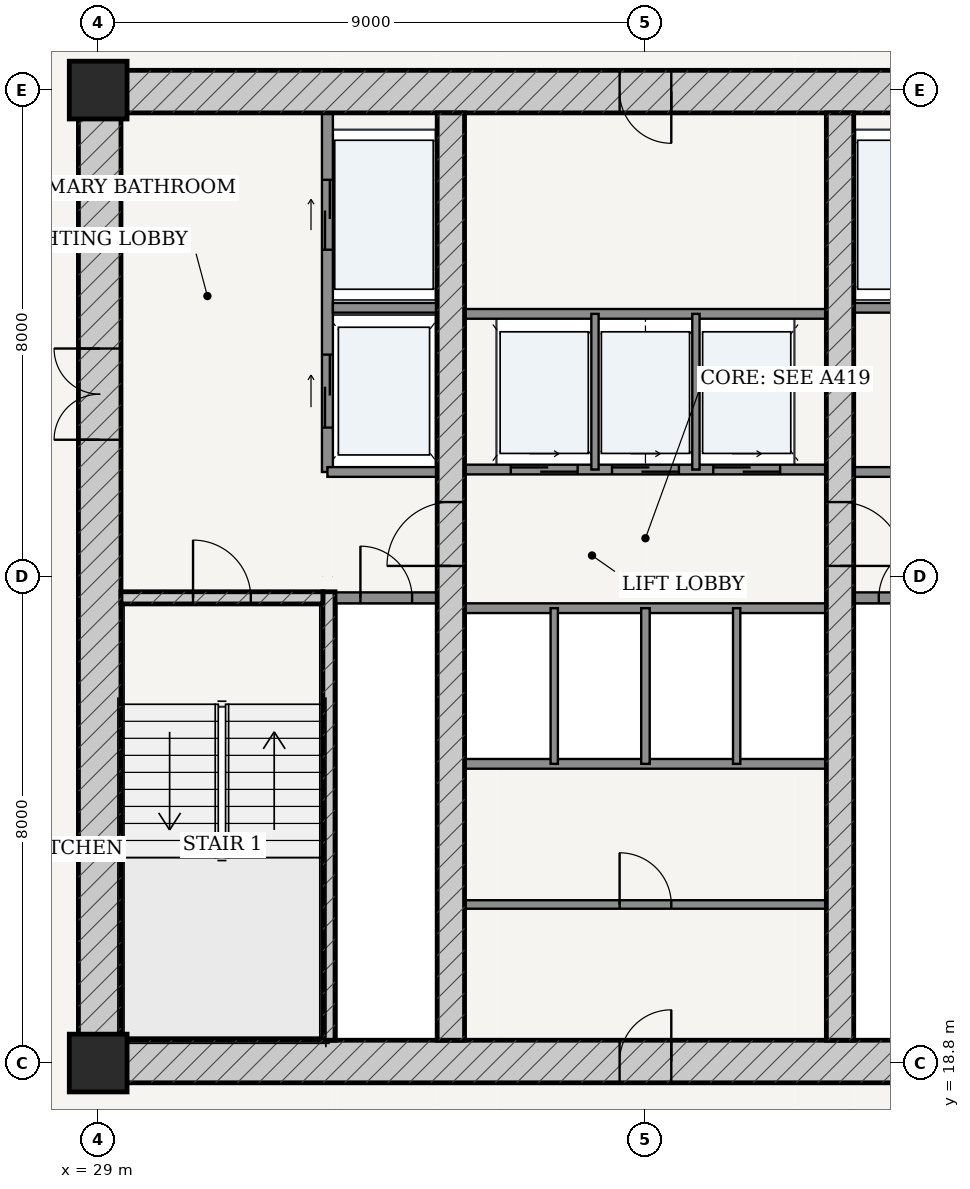
"""IFC4 building model, lengths in metres.
Left out: names, types, materials, properties, quantities, classifications, styles, units other than length and angle.
Written with IfcOpenShell. Run it as: python <this file> out.ifc"""

import sys

from ifc_helpers import new_model, si_unit, direction, frame, frame_2d, origin, origin_2d, place, context, subcontext, project, spatial, rectangle, extrude, source, transform, mapped, element, fill, save


model = new_model("IFC4")
c1 = context("Model", 3, precision=1e-05, world=origin(), true_north=direction((-0.2419218956, 0.970295726276)))
c2 = subcontext(c1, "Body", "Model", "MODEL_VIEW")
j1 = project(units=[si_unit("LENGTHUNIT", "METRE"), si_unit("PLANEANGLEUNIT", "RADIAN")], contexts=[c1])
p1 = place(None, origin())
s1 = spatial("IfcSite", under=j1, at=p1, CompositionType="ELEMENT")
p2 = place(p1, origin())
s2 = spatial("IfcBuilding", under=s1, at=p2, CompositionType="ELEMENT")
p3 = place(p2, frame((0.0, 0.0, 123.0)))
s3 = spatial("IfcBuildingStorey", under=s2, at=p3, CompositionType="ELEMENT", Elevation=123.0)
for number, where, z_axis, x_axis in (
    (1, (29.0, 18.8, 0.0), (0.0, 0.0, 1.0), (1.0, 0.0, 0.0)),
    (2, (29.0, 34.8, 0.0), (0.0, 0.0, 1.0), (1.0, 0.0, 0.0)),
):
    element("IfcColumn", number, at=place(p3, frame(where, z_axis=z_axis, x_axis=x_axis)), inside=s3, PredefinedType="COLUMN", context=c2, shape_type="SweptSolid", body=[
        extrude(rectangle(XDim=0.95, YDim=0.95, at=origin_2d()), origin(), (0.0, 0.0, 1.0), 3.6),
    ])
p4 = place(p3, frame((28.675, 18.825, 0.0), z_axis=(0.0, 0.0, 1.0), x_axis=(1.0, 0.0, 0.0)))
e3 = element("IfcWall", 3, at=p4, inside=s3, PredefinedType="SHEAR", context=c2, shape_type="SweptSolid", body=[
    extrude(rectangle(XDim=18.65, YDim=0.7, at=frame_2d((9.325, 0.0))), origin(), (0.0, 0.0, 1.0), 3.325),
])
p5 = place(p4, frame((8.9, 0.0, 0.0)))
e4 = element("IfcOpeningElement", 4, at=p5, cuts=e3, PredefinedType="OPENING", context=c2, shape_type="SweptSolid", body=[
    extrude(rectangle(XDim=0.85, YDim=2.1, at=frame_2d((0.425, 1.05))), frame((0.0, 0.36, 0.0), z_axis=(0.0, -1.0, 0.0), x_axis=(1.0, 0.0, 0.0)), (0.0, 0.0, 1.0), 0.72),
])
p6 = place(p3, frame((28.675, 34.775, 0.0), z_axis=(0.0, 0.0, 1.0), x_axis=(1.0, 0.0, 0.0)))
e5 = element("IfcWall", 5, at=p6, inside=s3, PredefinedType="SHEAR", context=c2, shape_type="SweptSolid", body=[
    extrude(rectangle(XDim=18.65, YDim=0.7, at=frame_2d((9.325, 0.0))), origin(), (0.0, 0.0, 1.0), 3.325),
])
p7 = place(p6, frame((8.9, 0.0, 0.0)))
e6 = element("IfcOpeningElement", 6, at=p7, cuts=e5, PredefinedType="OPENING", context=c2, shape_type="SweptSolid", body=[
    extrude(rectangle(XDim=0.85, YDim=2.1, at=frame_2d((0.425, 1.05))), frame((0.0, 0.36, 0.0), z_axis=(0.0, -1.0, 0.0), x_axis=(1.0, 0.0, 0.0)), (0.0, 0.0, 1.0), 0.72),
])
p8 = place(p3, frame((29.025, 19.175, 0.0), z_axis=(0.0, 0.0, 1.0), x_axis=(0.0, 1.0, 0.0)))
e7 = element("IfcWall", 7, at=p8, inside=s3, PredefinedType="SHEAR", context=c2, shape_type="SweptSolid", body=[
    extrude(rectangle(XDim=15.25, YDim=0.7, at=frame_2d((7.625, 0.0))), origin(), (0.0, 0.0, 1.0), 3.325),
])
p9 = place(p8, frame((9.875, 0.0, 0.0)))
e8 = element("IfcOpeningElement", 8, at=p9, cuts=e7, PredefinedType="OPENING", context=c2, shape_type="SweptSolid", body=[
    extrude(rectangle(XDim=1.5, YDim=2.2, at=frame_2d((0.75, 1.1))), frame((0.0, 0.36, 0.0), z_axis=(0.0, -1.0, 0.0), x_axis=(1.0, 0.0, 0.0)), (0.0, 0.0, 1.0), 0.72),
])
p10 = place(p3, frame((32.795, 19.175, 0.0), z_axis=(0.0, 0.0, 1.0), x_axis=(0.0, 1.0, 0.0)))
e9 = element("IfcWall", 9, at=p10, inside=s3, PredefinedType="SOLIDWALL", context=c2, shape_type="SweptSolid", body=[
    extrude(rectangle(XDim=7.375, YDim=0.2, at=frame_2d((3.688, 0.0))), origin(), (0.0, 0.0, 1.0), 3.325),
])
p11 = place(p3, frame((29.375, 26.45, 0.0), z_axis=(0.0, 0.0, 1.0), x_axis=(1.0, 0.0, 0.0)))
e10 = element("IfcWall", 10, at=p11, inside=s3, PredefinedType="SOLIDWALL", context=c2, shape_type="SweptSolid", body=[
    extrude(rectangle(XDim=3.32, YDim=0.2, at=frame_2d((1.66, 0.0))), origin(), (0.0, 0.0, 1.0), 3.325),
])
p12 = place(p11, frame((1.185, 0.0, 0.0)))
e11 = element("IfcOpeningElement", 11, at=p12, cuts=e10, PredefinedType="OPENING", context=c2, shape_type="SweptSolid", body=[
    extrude(rectangle(XDim=0.95, YDim=2.15, at=frame_2d((0.475, 1.075))), frame((0.0, 0.11, 0.0), z_axis=(0.0, -1.0, 0.0), x_axis=(1.0, 0.0, 0.0)), (0.0, 0.0, 1.0), 0.22),
])
p13 = place(p3, frame((34.8, 19.175, 0.0), z_axis=(0.0, 0.0, 1.0), x_axis=(0.0, 1.0, 0.0)))
e12 = element("IfcWall", 12, at=p13, inside=s3, PredefinedType="SHEAR", context=c2, shape_type="SweptSolid", body=[
    extrude(rectangle(XDim=15.25, YDim=0.45, at=frame_2d((7.625, 0.0))), origin(), (0.0, 0.0, 1.0), 3.325),
])
p14 = place(p13, frame((7.8, 0.0, 0.0)))
e13 = element("IfcOpeningElement", 13, at=p14, cuts=e12, PredefinedType="OPENING", context=c2, shape_type="SweptSolid", body=[
    extrude(rectangle(XDim=1.05, YDim=2.15, at=frame_2d((0.525, 1.075))), frame((0.0, 0.235, 0.0), z_axis=(0.0, -1.0, 0.0), x_axis=(1.0, 0.0, 0.0)), (0.0, 0.0, 1.0), 0.47),
])
p15 = place(p3, frame((41.2, 19.175, 0.0), z_axis=(0.0, 0.0, 1.0), x_axis=(0.0, 1.0, 0.0)))
e14 = element("IfcWall", 14, at=p15, inside=s3, PredefinedType="SHEAR", context=c2, shape_type="SweptSolid", body=[
    extrude(rectangle(XDim=15.25, YDim=0.45, at=frame_2d((7.625, 0.0))), origin(), (0.0, 0.0, 1.0), 3.325),
])
p16 = place(p15, frame((7.8, 0.0, 0.0)))
e15 = element("IfcOpeningElement", 15, at=p16, cuts=e14, PredefinedType="OPENING", context=c2, shape_type="SweptSolid", body=[
    extrude(rectangle(XDim=1.05, YDim=2.15, at=frame_2d((0.525, 1.075))), frame((0.0, 0.235, 0.0), z_axis=(0.0, -1.0, 0.0), x_axis=(1.0, 0.0, 0.0)), (0.0, 0.0, 1.0), 0.47),
])
p17 = place(p3, frame((32.9, 26.45, 0.0), z_axis=(0.0, 0.0, 1.0), x_axis=(1.0, 0.0, 0.0)))
e16 = element("IfcWall", 16, at=p17, inside=s3, PredefinedType="PARTITIONING", context=c2, shape_type="SweptSolid", body=[
    extrude(rectangle(XDim=1.675, YDim=0.18, at=frame_2d((0.837, 0.0))), origin(), (0.0, 0.0, 1.0), 3.325),
])
p18 = place(p17, frame((0.413, 0.0, 0.0)))
e17 = element("IfcOpeningElement", 17, at=p18, cuts=e16, PredefinedType="OPENING", context=c2, shape_type="SweptSolid", body=[
    extrude(rectangle(XDim=0.85, YDim=2.1, at=frame_2d((0.425, 1.05))), frame((0.0, 0.1, 0.0), z_axis=(0.0, -1.0, 0.0), x_axis=(1.0, 0.0, 0.0)), (0.0, 0.0, 1.0), 0.2),
])
p19 = place(p3, frame((41.425, 26.45, 0.0), z_axis=(0.0, 0.0, 1.0), x_axis=(1.0, 0.0, 0.0)))
e18 = element("IfcWall", 18, at=p19, inside=s3, PredefinedType="PARTITIONING", context=c2, shape_type="SweptSolid", body=[
    extrude(rectangle(XDim=1.675, YDim=0.18, at=frame_2d((0.837, 0.0))), origin(), (0.0, 0.0, 1.0), 3.325),
])
p20 = place(p19, frame((0.413, 0.0, 0.0)))
e19 = element("IfcOpeningElement", 19, at=p20, cuts=e18, PredefinedType="OPENING", context=c2, shape_type="SweptSolid", body=[
    extrude(rectangle(XDim=0.85, YDim=2.1, at=frame_2d((0.425, 1.05))), frame((0.0, 0.1, 0.0), z_axis=(0.0, -1.0, 0.0), x_axis=(1.0, 0.0, 0.0)), (0.0, 0.0, 1.0), 0.2),
])
p21 = place(p3, frame((32.77, 28.52, 0.0), z_axis=(0.0, 0.0, 1.0), x_axis=(0.0, 1.0, 0.0)))
e20 = element("IfcWall", 20, at=p21, inside=s3, PredefinedType="PARTITIONING", context=c2, shape_type="SweptSolid", body=[
    extrude(rectangle(XDim=5.905, YDim=0.18, at=frame_2d((2.953, 0.0))), origin(), (0.0, 0.0, 1.0), 3.325),
])
p22 = place(p21, frame((3.655, 0.0, 0.0)))
e21 = element("IfcOpeningElement", 21, at=p22, cuts=e20, PredefinedType="OPENING", context=c2, shape_type="SweptSolid", body=[
    extrude(rectangle(XDim=1.15, YDim=2.2, at=frame_2d((0.575, 1.1))), frame((0.0, 0.1, 0.0), z_axis=(0.0, -1.0, 0.0), x_axis=(1.0, 0.0, 0.0)), (0.0, 0.0, 1.0), 0.2),
])
p23 = place(p21, frame((0.73, 0.0, 0.0)))
e22 = element("IfcOpeningElement", 22, at=p23, cuts=e20, PredefinedType="OPENING", context=c2, shape_type="SweptSolid", body=[
    extrude(rectangle(XDim=1.2, YDim=2.25, at=frame_2d((0.6, 1.125))), frame((0.0, 0.1, 0.0), z_axis=(0.0, -1.0, 0.0), x_axis=(1.0, 0.0, 0.0)), (0.0, 0.0, 1.0), 0.2),
])
p24 = place(p3, frame((32.86, 31.22, 0.0), z_axis=(0.0, 0.0, 1.0), x_axis=(1.0, 0.0, 0.0)))
e23 = element("IfcWall", 23, at=p24, inside=s3, PredefinedType="PARTITIONING", context=c2, shape_type="SweptSolid", body=[
    extrude(rectangle(XDim=1.715, YDim=0.16, at=frame_2d((0.857, 0.0))), origin(), (0.0, 0.0, 1.0), 3.325),
])
p25 = place(p3, frame((32.77, 28.52, 0.0), z_axis=(0.0, 0.0, 1.0), x_axis=(1.0, 0.0, 0.0)))
e24 = element("IfcWall", 24, at=p25, inside=s3, PredefinedType="PARTITIONING", context=c2, shape_type="SweptSolid", body=[
    extrude(rectangle(XDim=1.805, YDim=0.16, at=frame_2d((0.902, 0.0))), origin(), (0.0, 0.0, 1.0), 3.325),
])
p26 = place(p3, frame((41.425, 31.22, 0.0), z_axis=(0.0, 0.0, 1.0), x_axis=(1.0, 0.0, 0.0)))
e25 = element("IfcWall", 25, at=p26, inside=s3, PredefinedType="PARTITIONING", context=c2, shape_type="SweptSolid", body=[
    extrude(rectangle(XDim=1.715, YDim=0.16, at=frame_2d((0.857, 0.0))), origin(), (0.0, 0.0, 1.0), 3.325),
])
p27 = place(p3, frame((41.425, 28.52, 0.0), z_axis=(0.0, 0.0, 1.0), x_axis=(1.0, 0.0, 0.0)))
e26 = element("IfcWall", 26, at=p27, inside=s3, PredefinedType="PARTITIONING", context=c2, shape_type="SweptSolid", body=[
    extrude(rectangle(XDim=1.805, YDim=0.16, at=frame_2d((0.902, 0.0))), origin(), (0.0, 0.0, 1.0), 3.325),
])
p28 = place(p3, frame((35.025, 28.56, 0.0), z_axis=(0.0, 0.0, 1.0), x_axis=(1.0, 0.0, 0.0)))
e27 = element("IfcWall", 27, at=p28, inside=s3, PredefinedType="PARTITIONING", context=c2, shape_type="SweptSolid", body=[
    extrude(rectangle(XDim=5.95, YDim=0.16, at=frame_2d((2.975, 0.0))), origin(), (0.0, 0.0, 1.0), 3.325),
])
p29 = place(p28, frame((0.76, 0.0, 0.0)))
e28 = element("IfcOpeningElement", 28, at=p29, cuts=e27, PredefinedType="OPENING", context=c2, shape_type="SweptSolid", body=[
    extrude(rectangle(XDim=1.1, YDim=2.2, at=frame_2d((0.55, 1.1))), frame((0.0, 0.09, 0.0), z_axis=(0.0, -1.0, 0.0), x_axis=(1.0, 0.0, 0.0)), (0.0, 0.0, 1.0), 0.18),
])
p30 = place(p28, frame((2.425, 0.0, 0.0)))
e29 = element("IfcOpeningElement", 29, at=p30, cuts=e27, PredefinedType="OPENING", context=c2, shape_type="SweptSolid", body=[
    extrude(rectangle(XDim=1.1, YDim=2.2, at=frame_2d((0.55, 1.1))), frame((0.0, 0.09, 0.0), z_axis=(0.0, -1.0, 0.0), x_axis=(1.0, 0.0, 0.0)), (0.0, 0.0, 1.0), 0.18),
])
p31 = place(p28, frame((4.09, 0.0, 0.0)))
e30 = element("IfcOpeningElement", 30, at=p31, cuts=e27, PredefinedType="OPENING", context=c2, shape_type="SweptSolid", body=[
    extrude(rectangle(XDim=1.1, YDim=2.2, at=frame_2d((0.55, 1.1))), frame((0.0, 0.09, 0.0), z_axis=(0.0, -1.0, 0.0), x_axis=(1.0, 0.0, 0.0)), (0.0, 0.0, 1.0), 0.18),
])
p32 = place(p3, frame((35.025, 31.12, 0.0), z_axis=(0.0, 0.0, 1.0), x_axis=(1.0, 0.0, 0.0)))
e31 = element("IfcWall", 31, at=p32, inside=s3, PredefinedType="PARTITIONING", context=c2, shape_type="SweptSolid", body=[
    extrude(rectangle(XDim=5.95, YDim=0.16, at=frame_2d((2.975, 0.0))), origin(), (0.0, 0.0, 1.0), 3.325),
])
for number, where, z_axis, x_axis in (
    (32, (37.17, 28.56, 0.0), (0.0, 0.0, 1.0), (0.0, 1.0, 0.0)),
    (33, (38.83, 28.56, 0.0), (0.0, 0.0, 1.0), (0.0, 1.0, 0.0)),
):
    element("IfcWall", number, at=place(p3, frame(where, z_axis=z_axis, x_axis=x_axis)), inside=s3, PredefinedType="PARTITIONING", context=c2, shape_type="SweptSolid", body=[
        extrude(rectangle(XDim=2.56, YDim=0.12, at=frame_2d((1.28, 0.0))), origin(), (0.0, 0.0, 1.0), 3.325),
    ])
for number, where, z_axis, x_axis in (
    (34, (35.025, 26.28, 0.0), (0.0, 0.0, 1.0), (1.0, 0.0, 0.0)),
    (35, (35.025, 23.72, 0.0), (0.0, 0.0, 1.0), (1.0, 0.0, 0.0)),
):
    element("IfcWall", number, at=place(p3, frame(where, z_axis=z_axis, x_axis=x_axis)), inside=s3, PredefinedType="PARTITIONING", context=c2, shape_type="SweptSolid", body=[
        extrude(rectangle(XDim=5.95, YDim=0.16, at=frame_2d((2.975, 0.0))), origin(), (0.0, 0.0, 1.0), 3.325),
    ])
p33 = place(p3, frame((36.5, 23.72, 0.0), z_axis=(0.0, 0.0, 1.0), x_axis=(0.0, 1.0, 0.0)))
e36 = element("IfcWall", 36, at=p33, inside=s3, PredefinedType="PARTITIONING", context=c2, shape_type="SweptSolid", body=[
    extrude(rectangle(XDim=2.56, YDim=0.12, at=frame_2d((1.28, 0.0))), origin(), (0.0, 0.0, 1.0), 3.325),
])
p34 = place(p3, frame((38.0, 23.72, 0.0), z_axis=(0.0, 0.0, 1.0), x_axis=(0.0, 1.0, 0.0)))
e37 = element("IfcWall", 37, at=p34, inside=s3, PredefinedType="PARTITIONING", context=c2, shape_type="SweptSolid", body=[
    extrude(rectangle(XDim=2.56, YDim=0.14, at=frame_2d((1.28, 0.0))), origin(), (0.0, 0.0, 1.0), 3.325),
])
p35 = place(p3, frame((39.5, 23.72, 0.0), z_axis=(0.0, 0.0, 1.0), x_axis=(0.0, 1.0, 0.0)))
e38 = element("IfcWall", 38, at=p35, inside=s3, PredefinedType="PARTITIONING", context=c2, shape_type="SweptSolid", body=[
    extrude(rectangle(XDim=2.56, YDim=0.12, at=frame_2d((1.28, 0.0))), origin(), (0.0, 0.0, 1.0), 3.325),
])
p36 = place(p3, frame((35.025, 21.407, 0.0), z_axis=(0.0, 0.0, 1.0), x_axis=(1.0, 0.0, 0.0)))
e39 = element("IfcWall", 39, at=p36, inside=s3, PredefinedType="PARTITIONING", context=c2, shape_type="SweptSolid", body=[
    extrude(rectangle(XDim=5.95, YDim=0.14, at=frame_2d((2.975, 0.0))), origin(), (0.0, 0.0, 1.0), 3.325),
])
p37 = place(p36, frame((2.55, 0.0, 0.0)))
e40 = element("IfcOpeningElement", 40, at=p37, cuts=e39, PredefinedType="OPENING", context=c2, shape_type="SweptSolid", body=[
    extrude(rectangle(XDim=0.85, YDim=2.1, at=frame_2d((0.425, 1.05))), frame((0.0, 0.08, 0.0), z_axis=(0.0, -1.0, 0.0), x_axis=(1.0, 0.0, 0.0)), (0.0, 0.0, 1.0), 0.16),
])
m1 = source(origin(), c2, "Body", "SweptSolid", [
    extrude(rectangle(XDim=1.5, YDim=2.2, at=frame_2d((0.75, 1.1))), frame((0.0, 0.025, 0.0), z_axis=(0.0, -1.0, 0.0), x_axis=(1.0, 0.0, 0.0)), (0.0, 0.0, 1.0), 0.05),
])
p38 = place(p9, origin())
e41 = element("IfcDoor", 41, at=p38, inside=s3, OperationType="DOUBLE_DOOR_SINGLE_SWING", PredefinedType="DOOR", context=c2, shape_type="MappedRepresentation", body=[
    mapped(m1, transform((0.0, 0.0, 0.0), scale=1.0)),
])
fill(e8, e41)
m2 = source(origin(), c2, "Body", "SweptSolid", [
    extrude(rectangle(XDim=1.05, YDim=2.15, at=frame_2d((0.525, 1.075))), frame((0.0, 0.025, 0.0), z_axis=(0.0, -1.0, 0.0), x_axis=(1.0, 0.0, 0.0)), (0.0, 0.0, 1.0), 0.05),
])
p39 = place(p14, origin())
e42 = element("IfcDoor", 42, at=p39, inside=s3, OperationType="SINGLE_SWING_LEFT", PredefinedType="DOOR", context=c2, shape_type="MappedRepresentation", body=[
    mapped(m2, transform((0.0, 0.0, 0.0), scale=1.0)),
])
fill(e13, e42)
p40 = place(p16, frame((1.05, 0.0, 0.0), z_axis=(0.0, 0.0, 1.0), x_axis=(-1.0, 0.0, 0.0)))
e43 = element("IfcDoor", 43, at=p40, inside=s3, OperationType="SINGLE_SWING_RIGHT", PredefinedType="DOOR", context=c2, shape_type="MappedRepresentation", body=[
    mapped(m2, transform((0.0, 0.0, 0.0), scale=1.0)),
])
fill(e15, e43)
m3 = source(origin(), c2, "Body", "SweptSolid", [
    extrude(rectangle(XDim=0.95, YDim=2.15, at=frame_2d((0.475, 1.075))), frame((0.0, 0.025, 0.0), z_axis=(0.0, -1.0, 0.0), x_axis=(1.0, 0.0, 0.0)), (0.0, 0.0, 1.0), 0.05),
])
p41 = place(p12, origin())
e44 = element("IfcDoor", 44, at=p41, inside=s3, OperationType="SINGLE_SWING_LEFT", PredefinedType="DOOR", context=c2, shape_type="MappedRepresentation", body=[
    mapped(m3, transform((0.0, 0.0, 0.0), scale=1.0)),
])
fill(e11, e44)
m4 = source(origin(), c2, "Body", "SweptSolid", [
    extrude(rectangle(XDim=0.85, YDim=2.1, at=frame_2d((0.425, 1.05))), frame((0.0, 0.025, 0.0), z_axis=(0.0, -1.0, 0.0), x_axis=(1.0, 0.0, 0.0)), (0.0, 0.0, 1.0), 0.05),
])
p42 = place(p18, origin())
e45 = element("IfcDoor", 45, at=p42, inside=s3, OperationType="SINGLE_SWING_LEFT", PredefinedType="DOOR", context=c2, shape_type="MappedRepresentation", body=[
    mapped(m4, transform((0.0, 0.0, 0.0), scale=1.0)),
])
fill(e17, e45)
p43 = place(p20, origin())
e46 = element("IfcDoor", 46, at=p43, inside=s3, OperationType="SINGLE_SWING_RIGHT", PredefinedType="DOOR", context=c2, shape_type="MappedRepresentation", body=[
    mapped(m4, transform((0.0, 0.0, 0.0), scale=1.0)),
])
fill(e19, e46)
p44 = place(p7, frame((0.85, 0.0, 0.0), z_axis=(0.0, 0.0, 1.0), x_axis=(-1.0, 0.0, 0.0)))
e47 = element("IfcDoor", 47, at=p44, inside=s3, OperationType="SINGLE_SWING_LEFT", PredefinedType="DOOR", context=c2, shape_type="MappedRepresentation", body=[
    mapped(m4, transform((0.0, 0.0, 0.0), scale=1.0)),
])
fill(e6, e47)
p45 = place(p5, origin())
e48 = element("IfcDoor", 48, at=p45, inside=s3, OperationType="SINGLE_SWING_RIGHT", PredefinedType="DOOR", context=c2, shape_type="MappedRepresentation", body=[
    mapped(m4, transform((0.0, 0.0, 0.0), scale=1.0)),
])
fill(e4, e48)
p46 = place(p37, origin())
e49 = element("IfcDoor", 49, at=p46, inside=s3, OperationType="SINGLE_SWING_LEFT", PredefinedType="DOOR", context=c2, shape_type="MappedRepresentation", body=[
    mapped(m4, transform((0.0, 0.0, 0.0), scale=1.0)),
])
fill(e40, e49)
m5 = source(origin(), c2, "Body", "SweptSolid", [
    extrude(rectangle(XDim=1.15, YDim=2.2, at=frame_2d((0.575, 1.1))), frame((0.0, 0.025, 0.0), z_axis=(0.0, -1.0, 0.0), x_axis=(1.0, 0.0, 0.0)), (0.0, 0.0, 1.0), 0.05),
])
p47 = place(p22, origin())
e50 = element("IfcDoor", 50, at=p47, inside=s3, OperationType="DOUBLE_DOOR_SLIDING", PredefinedType="DOOR", context=c2, shape_type="MappedRepresentation", body=[
    mapped(m5, transform((0.0, 0.0, 0.0), scale=1.0)),
])
fill(e21, e50)
m6 = source(origin(), c2, "Body", "SweptSolid", [
    extrude(rectangle(XDim=1.2, YDim=2.25, at=frame_2d((0.6, 1.125))), frame((0.0, 0.025, 0.0), z_axis=(0.0, -1.0, 0.0), x_axis=(1.0, 0.0, 0.0)), (0.0, 0.0, 1.0), 0.05),
])
p48 = place(p23, origin())
e51 = element("IfcDoor", 51, at=p48, inside=s3, OperationType="DOUBLE_DOOR_SLIDING", PredefinedType="DOOR", context=c2, shape_type="MappedRepresentation", body=[
    mapped(m6, transform((0.0, 0.0, 0.0), scale=1.0)),
])
fill(e22, e51)
m7 = source(origin(), c2, "Body", "SweptSolid", [
    extrude(rectangle(XDim=1.1, YDim=2.2, at=frame_2d((0.55, 1.1))), frame((0.0, 0.025, 0.0), z_axis=(0.0, -1.0, 0.0), x_axis=(1.0, 0.0, 0.0)), (0.0, 0.0, 1.0), 0.05),
])
p49 = place(p29, origin())
e52 = element("IfcDoor", 52, at=p49, inside=s3, OperationType="DOUBLE_DOOR_SLIDING", PredefinedType="DOOR", context=c2, shape_type="MappedRepresentation", body=[
    mapped(m7, transform((0.0, 0.0, 0.0), scale=1.0)),
])
fill(e28, e52)
p50 = place(p30, origin())
e53 = element("IfcDoor", 53, at=p50, inside=s3, OperationType="DOUBLE_DOOR_SLIDING", PredefinedType="DOOR", context=c2, shape_type="MappedRepresentation", body=[
    mapped(m7, transform((0.0, 0.0, 0.0), scale=1.0)),
])
fill(e29, e53)
p51 = place(p31, origin())
e54 = element("IfcDoor", 54, at=p51, inside=s3, OperationType="DOUBLE_DOOR_SLIDING", PredefinedType="DOOR", context=c2, shape_type="MappedRepresentation", body=[
    mapped(m7, transform((0.0, 0.0, 0.0), scale=1.0)),
])
fill(e30, e54)
save(model, sys.argv[1])
